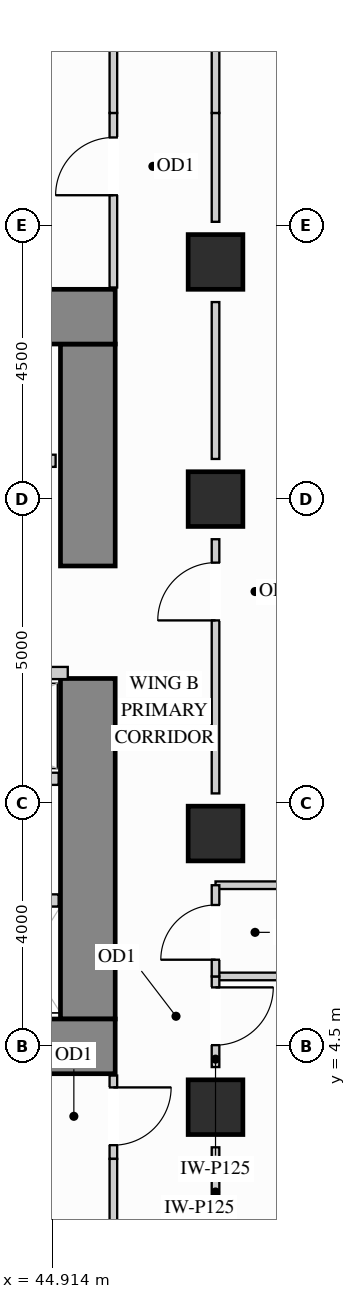
"""IFC4 building model, lengths in metres.
Left out: names, types, materials, properties, quantities, classifications, styles, units other than length and angle.
Written with IfcOpenShell. Run it as: python <this file> out.ifc"""

import sys

from ifc_helpers import new_model, si_unit, direction, frame, frame_2d, origin, origin_2d, place, context, subcontext, project, spatial, rectangle, extrude, source, transform, mapped, element, fill, save


model = new_model("IFC4")
c1 = context("Model", 3, precision=1e-05, world=origin(), true_north=direction((0.0, 1.0)))
c2 = subcontext(c1, "Body", "Model", "MODEL_VIEW")
j1 = project(units=[si_unit("LENGTHUNIT", "METRE"), si_unit("PLANEANGLEUNIT", "RADIAN")], contexts=[c1])
p1 = place(None, origin())
s1 = spatial("IfcSite", under=j1, at=p1, CompositionType="ELEMENT")
p2 = place(p1, origin())
s2 = spatial("IfcBuilding", under=s1, at=p2, CompositionType="ELEMENT")
p3 = place(p2, frame((0.0, 0.0, 65.7)))
s3 = spatial("IfcBuildingStorey", under=s2, at=p3, CompositionType="ELEMENT", Elevation=65.7)
m1 = source(origin(), c2, "Body", "SweptSolid", [
    extrude(rectangle(XDim=0.9, YDim=0.9, at=origin_2d()), origin(), (0.0, 0.0, 1.0), 3.38),
])
for number, where, z_axis, x_axis in (
    (1, (47.6, 13.5, 0.0), (0.0, 0.0, 1.0), (1.0, 0.0, 0.0)),
    (2, (47.6, 3.5, 0.0), (0.0, 0.0, 1.0), (1.0, 0.0, 0.0)),
    (3, (47.6, 8.0, 0.0), (0.0, 0.0, 1.0), (1.0, 0.0, 0.0)),
    (4, (47.6, 17.4, 0.0), (0.0, 0.0, 1.0), (1.0, 0.0, 0.0)),
):
    element("IfcColumn", number, at=place(p3, frame(where, z_axis=z_axis, x_axis=x_axis)), inside=s3, PredefinedType="COLUMN", context=c2, shape_type="MappedRepresentation", body=[
        mapped(m1, transform((0.0, 0.0, 0.0), x_axis=(1.0, 0.0, 0.0), y_axis=(0.0, 1.0, 0.0), z_axis=(0.0, 0.0, 1.0))),
    ])
m2 = source(origin(), c2, "Body", "SweptSolid", [
    extrude(rectangle(XDim=5.6, YDim=0.9, at=frame_2d((2.8, 0.0))), origin(), (0.0, 0.0, 1.0), 3.38),
])
p4 = place(p3, frame((45.5, 4.95, 0.0), z_axis=(0.0, 0.0, 1.0), x_axis=(0.0, 1.0, 0.0)))
e5 = element("IfcWall", 5, at=p4, inside=s3, PredefinedType="SHEAR", context=c2, shape_type="MappedRepresentation", body=[
    mapped(m2, transform((0.0, 0.0, 0.0), x_axis=(1.0, 0.0, 0.0), y_axis=(0.0, 1.0, 0.0), z_axis=(0.0, 0.0, 1.0))),
])
m3 = source(origin(), c2, "Body", "SweptSolid", [
    extrude(rectangle(XDim=3.65, YDim=0.9, at=frame_2d((1.825, 0.0))), origin(), (0.0, 0.0, 1.0), 3.38),
])
p5 = place(p3, frame((45.5, 12.4, 0.0), z_axis=(0.0, 0.0, 1.0), x_axis=(0.0, 1.0, 0.0)))
e6 = element("IfcWall", 6, at=p5, inside=s3, PredefinedType="SHEAR", context=c2, shape_type="MappedRepresentation", body=[
    mapped(m3, transform((0.0, 0.0, 0.0), x_axis=(1.0, 0.0, 0.0), y_axis=(0.0, 1.0, 0.0), z_axis=(0.0, 0.0, 1.0))),
])
m4 = source(origin(), c2, "Body", "SweptSolid", [
    extrude(rectangle(XDim=10.4, YDim=0.9, at=frame_2d((5.2, 0.0))), origin(), (0.0, 0.0, 1.0), 3.38),
])
for number, where, z_axis, x_axis in (
    (7, (35.55, 16.5, 0.0), (0.0, 0.0, 1.0), (1.0, 0.0, 0.0)),
    (8, (35.55, 4.5, 0.0), (0.0, 0.0, 1.0), (1.0, 0.0, 0.0)),
):
    element("IfcWall", number, at=place(p3, frame(where, z_axis=z_axis, x_axis=x_axis)), inside=s3, PredefinedType="SHEAR", context=c2, shape_type="MappedRepresentation", body=[
        mapped(m4, transform((0.0, 0.0, 0.0), x_axis=(1.0, 0.0, 0.0), y_axis=(0.0, 1.0, 0.0), z_axis=(0.0, 0.0, 1.0))),
    ])
m5 = source(origin(), c2, "Body", "SweptSolid", [
    extrude(rectangle(XDim=11.048, YDim=0.125, at=frame_2d((5.524, 0.0))), origin(), (0.0, 0.0, 1.0), 3.365),
])
for number, where, z_axis, x_axis in (
    (9, (47.6, 5.65, 0.0), (0.0, 0.0, 1.0), (1.0, 0.0, 0.0)),
    (10, (47.6, 7.15, 0.0), (0.0, 0.0, 1.0), (1.0, 0.0, 0.0)),
):
    element("IfcWall", number, at=place(p3, frame(where, z_axis=z_axis, x_axis=x_axis)), inside=s3, PredefinedType="PARTITIONING", context=c2, shape_type="MappedRepresentation", body=[
        mapped(m5, transform((0.0, 0.0, 0.0), x_axis=(1.0, 0.0, 0.0), y_axis=(0.0, 1.0, 0.0), z_axis=(0.0, 0.0, 1.0))),
    ])
p6 = place(p3, frame((47.6, 4.16, 0.0), z_axis=(0.0, 0.0, 1.0), x_axis=(0.0, 1.0, 0.0)))
e11 = element("IfcWall", 11, at=p6, inside=s3, PredefinedType="PARTITIONING", context=c2, shape_type="SweptSolid", body=[
    extrude(rectangle(XDim=1.49, YDim=0.125, at=frame_2d((0.745, 0.0))), origin(), (0.0, 0.0, 1.0), 2.67),
])
p7 = place(p6, frame((0.36, 0.0, 0.0)))
e12 = element("IfcOpeningElement", 12, at=p7, cuts=e11, PredefinedType="OPENING", context=c2, shape_type="SweptSolid", body=[
    extrude(rectangle(XDim=0.95, YDim=2.15, at=frame_2d((0.475, 1.075))), frame((0.0, 0.073, 0.0), z_axis=(0.0, -1.0, 0.0), x_axis=(1.0, 0.0, 0.0)), (0.0, 0.0, 1.0), 0.145),
])
m6 = source(origin(), c2, "Body", "SweptSolid", [
    extrude(rectangle(XDim=1.58, YDim=0.125, at=frame_2d((0.79, 0.0))), origin(), (0.0, 0.0, 1.0), 2.67),
])
p8 = place(p3, frame((47.6, 1.26, 0.0), z_axis=(0.0, 0.0, 1.0), x_axis=(0.0, 1.0, 0.0)))
e13 = element("IfcWall", 13, at=p8, inside=s3, PredefinedType="PARTITIONING", context=c2, shape_type="MappedRepresentation", body=[
    mapped(m6, transform((0.0, 0.0, 0.0), x_axis=(1.0, 0.0, 0.0), y_axis=(0.0, 1.0, 0.0), z_axis=(0.0, 0.0, 1.0))),
])
p9 = place(p3, frame((47.6, 8.66, 0.0), z_axis=(0.0, 0.0, 1.0), x_axis=(0.0, 1.0, 0.0)))
e14 = element("IfcWall", 14, at=p9, inside=s3, PredefinedType="PARTITIONING", context=c2, shape_type="SweptSolid", body=[
    extrude(rectangle(XDim=4.18, YDim=0.125, at=frame_2d((2.09, 0.0))), origin(), (0.0, 0.0, 1.0), 2.67),
])
p10 = place(p9, frame((2.845, 0.0, 0.0)))
e15 = element("IfcOpeningElement", 15, at=p10, cuts=e14, PredefinedType="OPENING", context=c2, shape_type="SweptSolid", body=[
    extrude(rectangle(XDim=0.95, YDim=2.15, at=frame_2d((0.475, 1.075))), frame((0.0, 0.073, 0.0), z_axis=(0.0, -1.0, 0.0), x_axis=(1.0, 0.0, 0.0)), (0.0, 0.0, 1.0), 0.145),
])
m7 = source(origin(), c2, "Body", "SweptSolid", [
    extrude(rectangle(XDim=2.58, YDim=0.125, at=frame_2d((1.29, 0.0))), origin(), (0.0, 0.0, 1.0), 2.67),
])
p11 = place(p3, frame((47.6, 14.16, 0.0), z_axis=(0.0, 0.0, 1.0), x_axis=(0.0, 1.0, 0.0)))
e16 = element("IfcWall", 16, at=p11, inside=s3, PredefinedType="PARTITIONING", context=c2, shape_type="MappedRepresentation", body=[
    mapped(m7, transform((0.0, 0.0, 0.0), x_axis=(1.0, 0.0, 0.0), y_axis=(0.0, 1.0, 0.0), z_axis=(0.0, 0.0, 1.0))),
])
m8 = source(origin(), c2, "Body", "SweptSolid", [
    extrude(rectangle(XDim=1.79, YDim=0.125, at=frame_2d((0.895, 0.0))), origin(), (0.0, 0.0, 1.0), 2.67),
])
p12 = place(p3, frame((47.6, 18.06, 0.0), z_axis=(0.0, 0.0, 1.0), x_axis=(0.0, 1.0, 0.0)))
e17 = element("IfcWall", 17, at=p12, inside=s3, PredefinedType="PARTITIONING", context=c2, shape_type="MappedRepresentation", body=[
    mapped(m8, transform((0.0, 0.0, 0.0), x_axis=(1.0, 0.0, 0.0), y_axis=(0.0, 1.0, 0.0), z_axis=(0.0, 0.0, 1.0))),
])
m9 = source(origin(), c2, "Body", "SweptSolid", [
    extrude(rectangle(XDim=1.39, YDim=0.125, at=frame_2d((0.695, 0.0))), origin(), (0.0, 0.0, 1.0), 2.67),
])
p13 = place(p3, frame((47.6, 19.85, 0.0), z_axis=(0.0, 0.0, 1.0), x_axis=(0.0, 1.0, 0.0)))
e18 = element("IfcWall", 18, at=p13, inside=s3, PredefinedType="PARTITIONING", context=c2, shape_type="MappedRepresentation", body=[
    mapped(m9, transform((0.0, 0.0, 0.0), x_axis=(1.0, 0.0, 0.0), y_axis=(0.0, 1.0, 0.0), z_axis=(0.0, 0.0, 1.0))),
])
p14 = place(p3, frame((47.6, 5.65, 0.0), z_axis=(0.0, 0.0, 1.0), x_axis=(0.0, 1.0, 0.0)))
e19 = element("IfcWall", 19, at=p14, inside=s3, PredefinedType="PARTITIONING", context=c2, shape_type="SweptSolid", body=[
    extrude(rectangle(XDim=1.5, YDim=0.125, at=frame_2d((0.75, 0.0))), origin(), (0.0, 0.0, 1.0), 2.67),
])
p15 = place(p14, frame((0.275, 0.0, 0.0)))
e20 = element("IfcOpeningElement", 20, at=p15, cuts=e19, PredefinedType="OPENING", context=c2, shape_type="SweptSolid", body=[
    extrude(rectangle(XDim=0.9, YDim=2.15, at=frame_2d((0.45, 1.075))), frame((0.0, 0.073, 0.0), z_axis=(0.0, -1.0, 0.0), x_axis=(1.0, 0.0, 0.0)), (0.0, 0.0, 1.0), 0.145),
])
p16 = place(p3, frame((45.92, 16.98, 0.0), z_axis=(0.0, 0.0, 1.0), x_axis=(0.0, 1.0, 0.0)))
e21 = element("IfcWall", 21, at=p16, inside=s3, PredefinedType="PARTITIONING", context=c2, shape_type="SweptSolid", body=[
    extrude(rectangle(XDim=2.87, YDim=0.125, at=frame_2d((1.435, 0.0))), origin(), (0.0, 0.0, 1.0), 3.365),
])
p17 = place(p16, frame((1.517, 0.0, 0.0)))
e22 = element("IfcOpeningElement", 22, at=p17, cuts=e21, PredefinedType="OPENING", context=c2, shape_type="SweptSolid", body=[
    extrude(rectangle(XDim=0.95, YDim=2.15, at=frame_2d((0.475, 1.075))), frame((0.0, 0.073, 0.0), z_axis=(0.0, -1.0, 0.0), x_axis=(1.0, 0.0, 0.0)), (0.0, 0.0, 1.0), 0.145),
])
m10 = source(origin(), c2, "Body", "SweptSolid", [
    extrude(rectangle(XDim=2.298, YDim=0.125, at=frame_2d((1.149, 0.0))), origin(), (0.0, 0.0, 1.0), 3.365),
])
p18 = place(p3, frame((45.92, 19.85, 0.0), z_axis=(0.0, 0.0, 1.0), x_axis=(0.0, 1.0, 0.0)))
e23 = element("IfcWall", 23, at=p18, inside=s3, PredefinedType="PARTITIONING", context=c2, shape_type="MappedRepresentation", body=[
    mapped(m10, transform((0.0, 0.0, 0.0), x_axis=(1.0, 0.0, 0.0), y_axis=(0.0, 1.0, 0.0), z_axis=(0.0, 0.0, 1.0))),
])
p19 = place(p3, frame((45.92, 2.65, 0.0), z_axis=(0.0, 0.0, 1.0), x_axis=(0.0, 1.0, 0.0)))
e24 = element("IfcWall", 24, at=p19, inside=s3, PredefinedType="PARTITIONING", context=c2, shape_type="SweptSolid", body=[
    extrude(rectangle(XDim=1.37, YDim=0.125, at=frame_2d((0.685, 0.0))), origin(), (0.0, 0.0, 1.0), 3.365),
])
p20 = place(p19, frame((0.225, 0.0, 0.0)))
e25 = element("IfcOpeningElement", 25, at=p20, cuts=e24, PredefinedType="OPENING", context=c2, shape_type="SweptSolid", body=[
    extrude(rectangle(XDim=0.95, YDim=2.15, at=frame_2d((0.475, 1.075))), frame((0.0, 0.073, 0.0), z_axis=(0.0, -1.0, 0.0), x_axis=(1.0, 0.0, 0.0)), (0.0, 0.0, 1.0), 0.145),
])
p21 = place(p3, frame((45.92, 0.352, 0.0), z_axis=(0.0, 0.0, 1.0), x_axis=(0.0, 1.0, 0.0)))
e26 = element("IfcWall", 26, at=p21, inside=s3, PredefinedType="PARTITIONING", context=c2, shape_type="MappedRepresentation", body=[
    mapped(m10, transform((0.0, 0.0, 0.0), x_axis=(1.0, 0.0, 0.0), y_axis=(0.0, 1.0, 0.0), z_axis=(0.0, 0.0, 1.0))),
])
m11 = source(origin(), c2, "Body", "SweptSolid", [
    extrude(rectangle(XDim=1.17, YDim=0.2, at=frame_2d((0.585, 0.0))), origin(), (0.0, 0.0, 1.0), 3.365),
])
p22 = place(p3, frame((43.85, 6.9, 0.0), z_axis=(0.0, 0.0, 1.0), x_axis=(1.0, 0.0, 0.0)))
e27 = element("IfcWall", 27, at=p22, inside=s3, PredefinedType="PARTITIONING", context=c2, shape_type="MappedRepresentation", body=[
    mapped(m11, transform((0.0, 0.0, 0.0), x_axis=(1.0, 0.0, 0.0), y_axis=(0.0, 1.0, 0.0), z_axis=(0.0, 0.0, 1.0))),
])
p23 = place(p3, frame((42.23, 14.13, 0.0), z_axis=(0.0, 0.0, 1.0), x_axis=(1.0, 0.0, 0.0)))
e28 = element("IfcWall", 28, at=p23, inside=s3, PredefinedType="PARTITIONING", context=c2, shape_type="SweptSolid", body=[
    extrude(rectangle(XDim=2.74, YDim=0.2, at=frame_2d((1.37, 0.0))), origin(), (0.0, 0.0, 1.0), 3.365),
])
p24 = place(p23, frame((0.82, 0.0, 0.0)))
e29 = element("IfcOpeningElement", 29, at=p24, cuts=e28, PredefinedType="OPENING", context=c2, shape_type="SweptSolid", body=[
    extrude(rectangle(XDim=1.1, YDim=2.2, at=frame_2d((0.55, 1.1))), frame((0.0, 0.11, 0.0), z_axis=(0.0, -1.0, 0.0), x_axis=(1.0, 0.0, 0.0)), (0.0, 0.0, 1.0), 0.22),
])
m12 = source(origin(), c2, "Body", "SweptSolid", [
    extrude(rectangle(XDim=3.49, YDim=0.2, at=frame_2d((1.745, 0.0))), origin(), (0.0, 0.0, 1.0), 3.365),
])
p25 = place(p3, frame((41.68, 10.64, 0.0), z_axis=(0.0, 0.0, 1.0), x_axis=(1.0, 0.0, 0.0)))
e30 = element("IfcWall", 30, at=p25, inside=s3, PredefinedType="PARTITIONING", context=c2, shape_type="MappedRepresentation", body=[
    mapped(m12, transform((0.0, 0.0, 0.0), x_axis=(1.0, 0.0, 0.0), y_axis=(0.0, 1.0, 0.0), z_axis=(0.0, 0.0, 1.0))),
])
m13 = source(origin(), c2, "Body", "SweptSolid", [
    extrude(rectangle(XDim=3.34, YDim=0.2, at=frame_2d((1.67, 0.0))), origin(), (0.0, 0.0, 1.0), 3.365),
])
p26 = place(p3, frame((41.68, 8.9, 0.0), z_axis=(0.0, 0.0, 1.0), x_axis=(1.0, 0.0, 0.0)))
e31 = element("IfcWall", 31, at=p26, inside=s3, PredefinedType="PARTITIONING", context=c2, shape_type="MappedRepresentation", body=[
    mapped(m13, transform((0.0, 0.0, 0.0), x_axis=(1.0, 0.0, 0.0), y_axis=(0.0, 1.0, 0.0), z_axis=(0.0, 0.0, 1.0))),
])
m14 = source(origin(), c2, "Body", "SweptSolid", [
    extrude(rectangle(XDim=0.95, YDim=2.15, at=frame_2d((0.475, 1.075))), frame((0.0, 0.025, 0.0), z_axis=(0.0, -1.0, 0.0), x_axis=(1.0, 0.0, 0.0)), (0.0, 0.0, 1.0), 0.05),
])
p27 = place(p17, origin())
e32 = element("IfcDoor", 32, at=p27, inside=s3, OperationType="SINGLE_SWING_LEFT", PredefinedType="DOOR", context=c2, shape_type="MappedRepresentation", body=[
    mapped(m14, transform((0.0, 0.0, 0.0), x_axis=(1.0, 0.0, 0.0), y_axis=(0.0, 1.0, 0.0), z_axis=(0.0, 0.0, 1.0))),
])
fill(e22, e32)
p28 = place(p20, origin())
e33 = element("IfcDoor", 33, at=p28, inside=s3, OperationType="SINGLE_SWING_RIGHT", PredefinedType="DOOR", context=c2, shape_type="MappedRepresentation", body=[
    mapped(m14, transform((0.0, 0.0, 0.0), x_axis=(1.0, 0.0, 0.0), y_axis=(0.0, 1.0, 0.0), z_axis=(0.0, 0.0, 1.0))),
])
fill(e25, e33)
p29 = place(p7, origin())
e34 = element("IfcDoor", 34, at=p29, inside=s3, OperationType="SINGLE_SWING_RIGHT", PredefinedType="DOOR", context=c2, shape_type="MappedRepresentation", body=[
    mapped(m14, transform((0.0, 0.0, 0.0), x_axis=(1.0, 0.0, 0.0), y_axis=(0.0, 1.0, 0.0), z_axis=(0.0, 0.0, 1.0))),
])
fill(e12, e34)
p30 = place(p10, origin())
e35 = element("IfcDoor", 35, at=p30, inside=s3, OperationType="SINGLE_SWING_LEFT", PredefinedType="DOOR", context=c2, shape_type="MappedRepresentation", body=[
    mapped(m14, transform((0.0, 0.0, 0.0), x_axis=(1.0, 0.0, 0.0), y_axis=(0.0, 1.0, 0.0), z_axis=(0.0, 0.0, 1.0))),
])
fill(e15, e35)
m15 = source(origin(), c2, "Body", "SweptSolid", [
    extrude(rectangle(XDim=0.9, YDim=2.15, at=frame_2d((0.45, 1.075))), frame((0.0, 0.025, 0.0), z_axis=(0.0, -1.0, 0.0), x_axis=(1.0, 0.0, 0.0)), (0.0, 0.0, 1.0), 0.05),
])
p31 = place(p15, origin())
e36 = element("IfcDoor", 36, at=p31, inside=s3, OperationType="SINGLE_SWING_LEFT", PredefinedType="DOOR", context=c2, shape_type="MappedRepresentation", body=[
    mapped(m15, transform((0.0, 0.0, 0.0), x_axis=(1.0, 0.0, 0.0), y_axis=(0.0, 1.0, 0.0), z_axis=(0.0, 0.0, 1.0))),
])
fill(e20, e36)
save(model, sys.argv[1])
